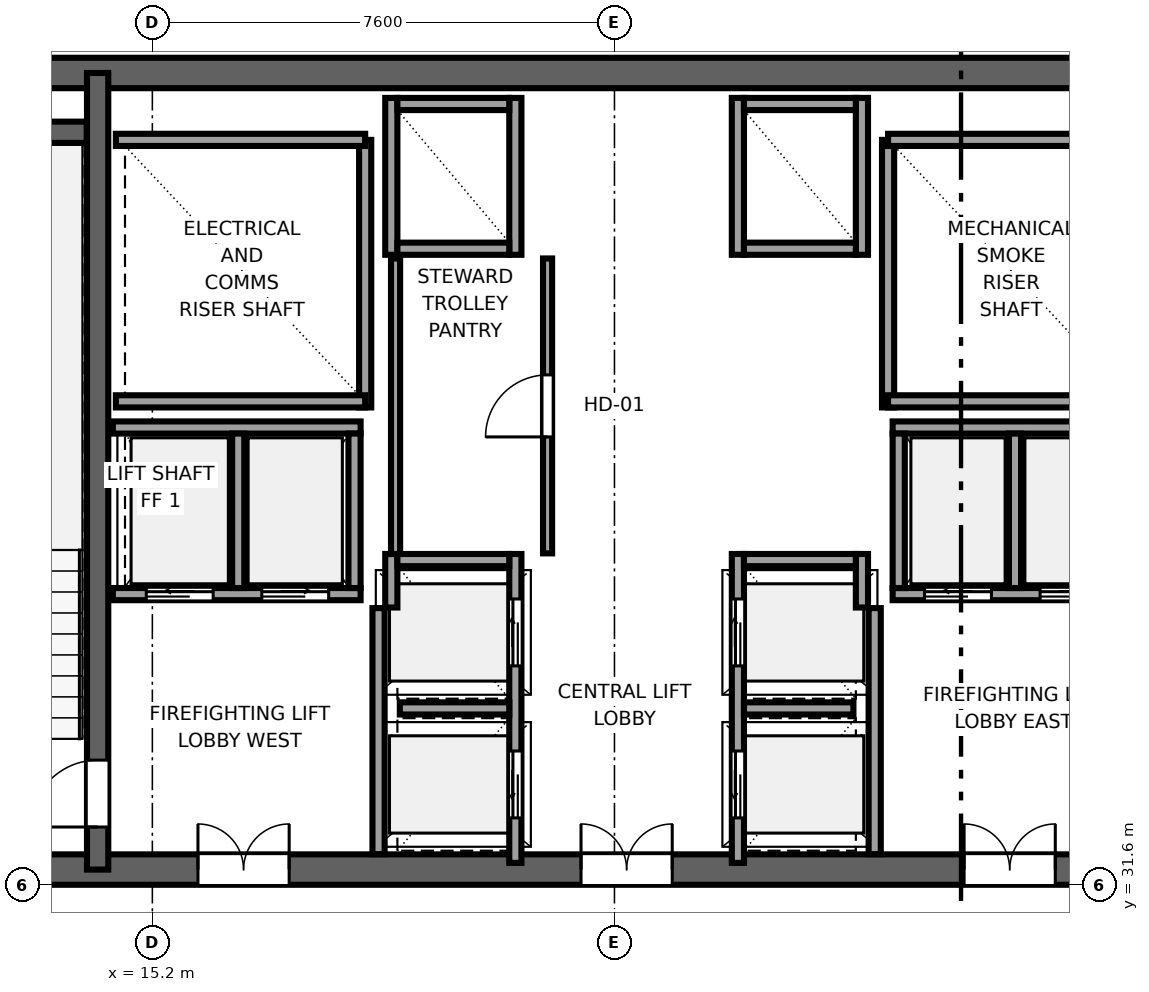
"""IFC4 building model, lengths in metres.
Left out: names, types, materials, properties, quantities, classifications, styles, units other than length and angle.
Written with IfcOpenShell. Run it as: python <this file> out.ifc"""

import sys

from ifc_helpers import new_model, si_unit, direction, frame, frame_2d, origin, place, context, subcontext, project, spatial, rectangle, extrude, source, transform, mapped, element, fill, save


model = new_model("IFC4")
c1 = context("Model", 3, precision=1e-05, world=origin(), true_north=direction((0.0, 1.0)))
c2 = subcontext(c1, "Body", "Model", "MODEL_VIEW")
j1 = project(units=[si_unit("LENGTHUNIT", "METRE"), si_unit("PLANEANGLEUNIT", "RADIAN")], contexts=[c1])
p1 = place(None, origin())
s1 = spatial("IfcSite", under=j1, at=p1, CompositionType="ELEMENT")
p2 = place(p1, origin())
s2 = spatial("IfcBuilding", under=s1, at=p2, CompositionType="ELEMENT")
p3 = place(p2, frame((0.0, 0.0, 241.65)))
s3 = spatial("IfcBuildingStorey", under=s2, at=p3, CompositionType="ELEMENT", Elevation=241.65)
p4 = place(p3, frame((10.0, 31.85, 0.0), z_axis=(0.0, 0.0, 1.0), x_axis=(1.0, 0.0, 0.0)))
e1 = element("IfcWall", 1, at=p4, inside=s3, PredefinedType="SHEAR", context=c2, shape_type="SweptSolid", body=[
    extrude(rectangle(XDim=26.0, YDim=0.5, at=frame_2d((13.0, 0.0))), origin(), (0.0, 0.0, 1.0), 3.55),
])
p5 = place(p4, frame((7.45, 0.0, 0.0), z_axis=(0.0, 0.0, 1.0), x_axis=(-1.0, 0.0, 0.0)))
e2 = element("IfcOpeningElement", 2, at=p5, cuts=e1, PredefinedType="OPENING", context=c2, shape_type="SweptSolid", body=[
    extrude(rectangle(XDim=1.5, YDim=2.04, at=frame_2d((0.75, 1.02))), frame((0.0, 0.26, 0.0), z_axis=(0.0, -1.0, 0.0), x_axis=(1.0, 0.0, 0.0)), (0.0, 0.0, 1.0), 0.52),
])
p6 = place(p4, frame((13.75, 0.0, 0.0), z_axis=(0.0, 0.0, 1.0), x_axis=(-1.0, 0.0, 0.0)))
e3 = element("IfcOpeningElement", 3, at=p6, cuts=e1, PredefinedType="OPENING", context=c2, shape_type="SweptSolid", body=[
    extrude(rectangle(XDim=1.5, YDim=2.04, at=frame_2d((0.75, 1.02))), frame((0.0, 0.26, 0.0), z_axis=(0.0, -1.0, 0.0), x_axis=(1.0, 0.0, 0.0)), (0.0, 0.0, 1.0), 0.52),
])
p7 = place(p4, frame((20.05, 0.0, 0.0), z_axis=(0.0, 0.0, 1.0), x_axis=(-1.0, 0.0, 0.0)))
e4 = element("IfcOpeningElement", 4, at=p7, cuts=e1, PredefinedType="OPENING", context=c2, shape_type="SweptSolid", body=[
    extrude(rectangle(XDim=1.5, YDim=2.04, at=frame_2d((0.75, 1.02))), frame((0.0, 0.26, 0.0), z_axis=(0.0, -1.0, 0.0), x_axis=(1.0, 0.0, 0.0)), (0.0, 0.0, 1.0), 0.52),
])
p8 = place(p3, frame((10.0, 44.95, 0.0), z_axis=(0.0, 0.0, 1.0), x_axis=(1.0, 0.0, 0.0)))
e5 = element("IfcWall", 5, at=p8, inside=s3, PredefinedType="SHEAR", context=c2, shape_type="SweptSolid", body=[
    extrude(rectangle(XDim=26.0, YDim=0.5, at=frame_2d((13.0, 0.0))), origin(), (0.0, 0.0, 1.0), 3.55),
])
p9 = place(p3, frame((14.3, 31.85, 0.0), z_axis=(0.0, 0.0, 1.0), x_axis=(0.0, 1.0, 0.0)))
e6 = element("IfcWall", 6, at=p9, inside=s3, PredefinedType="SHEAR", context=c2, shape_type="SweptSolid", body=[
    extrude(rectangle(XDim=13.1, YDim=0.35, at=frame_2d((6.55, 0.0))), origin(), (0.0, 0.0, 1.0), 3.55),
])
p10 = place(p9, frame((0.7, 0.0, 0.0)))
e7 = element("IfcOpeningElement", 7, at=p10, cuts=e6, PredefinedType="OPENING", context=c2, shape_type="SweptSolid", body=[
    extrude(rectangle(XDim=1.1, YDim=2.12, at=frame_2d((0.55, 1.06))), frame((0.0, 0.185, 0.0), z_axis=(0.0, -1.0, 0.0), x_axis=(1.0, 0.0, 0.0)), (0.0, 0.0, 1.0), 0.37),
])
p11 = place(p3, frame((10.52, 43.975, 0.0), z_axis=(0.0, 0.0, 1.0), x_axis=(1.0, 0.0, 0.0)))
e8 = element("IfcWall", 8, at=p11, inside=s3, PredefinedType="SHEAR", context=c2, shape_type="SweptSolid", body=[
    extrude(rectangle(XDim=3.6, YDim=0.35, at=frame_2d((1.8, 0.0))), origin(), (0.0, 0.0, 1.0), 3.55),
])
p12 = place(p3, frame((18.7, 39.45, 0.0), z_axis=(0.0, 0.0, 1.0), x_axis=(0.0, 1.0, 0.0)))
e9 = element("IfcWall", 9, at=p12, inside=s3, PredefinedType="SOLIDWALL", context=c2, shape_type="SweptSolid", body=[
    extrude(rectangle(XDim=4.4, YDim=0.2, at=frame_2d((2.2, 0.0))), origin(), (0.0, 0.0, 1.0), 3.37),
])
for number, where, z_axis, x_axis in (
    (10, (14.6, 39.55, 0.0), (0.0, 0.0, 1.0), (1.0, 0.0, 0.0)),
    (11, (14.6, 43.85, 0.0), (0.0, 0.0, 1.0), (1.0, 0.0, 0.0)),
):
    element("IfcWall", number, at=place(p3, frame(where, z_axis=z_axis, x_axis=x_axis)), inside=s3, PredefinedType="SOLIDWALL", context=c2, shape_type="SweptSolid", body=[
        extrude(rectangle(XDim=4.1, YDim=0.2, at=frame_2d((2.05, 0.0))), origin(), (0.0, 0.0, 1.0), 3.37),
    ])
p13 = place(p3, frame((27.3, 39.45, 0.0), z_axis=(0.0, 0.0, 1.0), x_axis=(0.0, 1.0, 0.0)))
e12 = element("IfcWall", 12, at=p13, inside=s3, PredefinedType="SOLIDWALL", context=c2, shape_type="SweptSolid", body=[
    extrude(rectangle(XDim=4.4, YDim=0.2, at=frame_2d((2.2, 0.0))), origin(), (0.0, 0.0, 1.0), 3.37),
])
for number, where, z_axis, x_axis in (
    (13, (27.3, 39.55, 0.0), (0.0, 0.0, 1.0), (1.0, 0.0, 0.0)),
    (14, (27.3, 43.85, 0.0), (0.0, 0.0, 1.0), (1.0, 0.0, 0.0)),
):
    element("IfcWall", number, at=place(p3, frame(where, z_axis=z_axis, x_axis=x_axis)), inside=s3, PredefinedType="SOLIDWALL", context=c2, shape_type="SweptSolid", body=[
        extrude(rectangle(XDim=4.1, YDim=0.2, at=frame_2d((2.05, 0.0))), origin(), (0.0, 0.0, 1.0), 3.37),
    ])
for number, where, z_axis, x_axis in (
    (15, (18.92, 32.104, 0.0), (0.0, 0.0, 1.0), (0.0, 1.0, 0.0)),
    (16, (27.08, 32.104, 0.0), (0.0, 0.0, 1.0), (0.0, 1.0, 0.0)),
):
    element("IfcWall", number, at=place(p3, frame(where, z_axis=z_axis, x_axis=x_axis)), inside=s3, PredefinedType="SOLIDWALL", context=c2, shape_type="SweptSolid", body=[
        extrude(rectangle(XDim=4.046, YDim=0.2, at=frame_2d((2.023, 0.0))), origin(), (0.0, 0.0, 1.0), 3.37),
    ])
p14 = place(p3, frame((21.17, 31.96, 0.0), z_axis=(0.0, 0.0, 1.0), x_axis=(0.0, 1.0, 0.0)))
e17 = element("IfcWall", 17, at=p14, inside=s3, PredefinedType="SOLIDWALL", context=c2, shape_type="SweptSolid", body=[
    extrude(rectangle(XDim=5.08, YDim=0.2, at=frame_2d((2.54, 0.0))), origin(), (0.0, 0.0, 1.0), 3.37),
])
p15 = place(p14, frame((0.74, 0.0, 0.0)))
e18 = element("IfcOpeningElement", 18, at=p15, cuts=e17, PredefinedType="OPENING", context=c2, shape_type="SweptSolid", body=[
    extrude(rectangle(XDim=1.1, YDim=2.12, at=frame_2d((0.55, 1.06))), frame((0.0, 0.11, 0.0), z_axis=(0.0, -1.0, 0.0), x_axis=(1.0, 0.0, 0.0)), (0.0, 0.0, 1.0), 0.22),
])
p16 = place(p14, frame((3.24, 0.0, 0.0)))
e19 = element("IfcOpeningElement", 19, at=p16, cuts=e17, PredefinedType="OPENING", context=c2, shape_type="SweptSolid", body=[
    extrude(rectangle(XDim=1.1, YDim=2.12, at=frame_2d((0.55, 1.06))), frame((0.0, 0.11, 0.0), z_axis=(0.0, -1.0, 0.0), x_axis=(1.0, 0.0, 0.0)), (0.0, 0.0, 1.0), 0.22),
])
p17 = place(p3, frame((19.13, 36.16, 0.0), z_axis=(0.0, 0.0, 1.0), x_axis=(0.0, 1.0, 0.0)))
e20 = element("IfcWall", 20, at=p17, inside=s3, PredefinedType="SOLIDWALL", context=c2, shape_type="SweptSolid", body=[
    extrude(rectangle(XDim=0.88, YDim=0.2, at=frame_2d((0.44, 0.0))), origin(), (0.0, 0.0, 1.0), 3.37),
])
p18 = place(p3, frame((19.23, 36.94, 0.0), z_axis=(0.0, 0.0, 1.0), x_axis=(1.0, 0.0, 0.0)))
e21 = element("IfcWall", 21, at=p18, inside=s3, PredefinedType="SOLIDWALL", context=c2, shape_type="SweptSolid", body=[
    extrude(rectangle(XDim=1.84, YDim=0.2, at=frame_2d((0.92, 0.0))), origin(), (0.0, 0.0, 1.0), 3.37),
])
p19 = place(p3, frame((19.27, 34.5, 0.0), z_axis=(0.0, 0.0, 1.0), x_axis=(1.0, 0.0, 0.0)))
e22 = element("IfcWall", 22, at=p19, inside=s3, PredefinedType="SOLIDWALL", context=c2, shape_type="SweptSolid", body=[
    extrude(rectangle(XDim=1.8, YDim=0.2, at=frame_2d((0.9, 0.0))), origin(), (0.0, 0.0, 1.0), 3.37),
])
for number, where, z_axis, x_axis in (
    (23, (21.17, 41.96, 0.0), (0.0, 0.0, 1.0), (0.0, 1.0, 0.0)),
    (24, (19.13, 41.96, 0.0), (0.0, 0.0, 1.0), (0.0, 1.0, 0.0)),
):
    element("IfcWall", number, at=place(p3, frame(where, z_axis=z_axis, x_axis=x_axis)), inside=s3, PredefinedType="SOLIDWALL", context=c2, shape_type="SweptSolid", body=[
        extrude(rectangle(XDim=2.58, YDim=0.2, at=frame_2d((1.29, 0.0))), origin(), (0.0, 0.0, 1.0), 3.37),
    ])
for number, where, z_axis, x_axis in (
    (25, (19.23, 42.06, 0.0), (0.0, 0.0, 1.0), (1.0, 0.0, 0.0)),
    (26, (19.23, 44.44, 0.0), (0.0, 0.0, 1.0), (1.0, 0.0, 0.0)),
):
    element("IfcWall", number, at=place(p3, frame(where, z_axis=z_axis, x_axis=x_axis)), inside=s3, PredefinedType="SOLIDWALL", context=c2, shape_type="SweptSolid", body=[
        extrude(rectangle(XDim=1.84, YDim=0.2, at=frame_2d((0.92, 0.0))), origin(), (0.0, 0.0, 1.0), 3.37),
    ])
p20 = place(p3, frame((27.375, 36.38, 0.0), z_axis=(0.0, 0.0, 1.0), x_axis=(1.0, 0.0, 0.0)))
e27 = element("IfcWall", 27, at=p20, inside=s3, PredefinedType="SOLIDWALL", context=c2, shape_type="SweptSolid", body=[
    extrude(rectangle(XDim=4.075, YDim=0.2, at=frame_2d((2.038, 0.0))), origin(), (0.0, 0.0, 1.0), 3.37),
])
p21 = place(p20, frame((0.525, 0.0, 0.0)))
e28 = element("IfcOpeningElement", 28, at=p21, cuts=e27, PredefinedType="OPENING", context=c2, shape_type="SweptSolid", body=[
    extrude(rectangle(XDim=1.1, YDim=2.12, at=frame_2d((0.55, 1.06))), frame((0.0, 0.11, 0.0), z_axis=(0.0, -1.0, 0.0), x_axis=(1.0, 0.0, 0.0)), (0.0, 0.0, 1.0), 0.22),
])
p22 = place(p20, frame((2.425, 0.0, 0.0)))
e29 = element("IfcOpeningElement", 29, at=p22, cuts=e27, PredefinedType="OPENING", context=c2, shape_type="SweptSolid", body=[
    extrude(rectangle(XDim=1.1, YDim=2.12, at=frame_2d((0.55, 1.06))), frame((0.0, 0.11, 0.0), z_axis=(0.0, -1.0, 0.0), x_axis=(1.0, 0.0, 0.0)), (0.0, 0.0, 1.0), 0.22),
])
p23 = place(p3, frame((27.375, 39.12, 0.0), z_axis=(0.0, 0.0, 1.0), x_axis=(1.0, 0.0, 0.0)))
e30 = element("IfcWall", 30, at=p23, inside=s3, PredefinedType="SOLIDWALL", context=c2, shape_type="SweptSolid", body=[
    extrude(rectangle(XDim=4.075, YDim=0.2, at=frame_2d((2.038, 0.0))), origin(), (0.0, 0.0, 1.0), 3.37),
])
for number, where, z_axis, x_axis in (
    (31, (27.475, 36.48, 0.0), (0.0, 0.0, 1.0), (0.0, 1.0, 0.0)),
    (32, (29.387, 36.48, 0.0), (0.0, 0.0, 1.0), (0.0, 1.0, 0.0)),
):
    element("IfcWall", number, at=place(p3, frame(where, z_axis=z_axis, x_axis=x_axis)), inside=s3, PredefinedType="SOLIDWALL", context=c2, shape_type="SweptSolid", body=[
        extrude(rectangle(XDim=2.54, YDim=0.2, at=frame_2d((1.27, 0.0))), origin(), (0.0, 0.0, 1.0), 3.37),
    ])
p24 = place(p3, frame((14.55, 36.38, 0.0), z_axis=(0.0, 0.0, 1.0), x_axis=(1.0, 0.0, 0.0)))
e33 = element("IfcWall", 33, at=p24, inside=s3, PredefinedType="SOLIDWALL", context=c2, shape_type="SweptSolid", body=[
    extrude(rectangle(XDim=4.075, YDim=0.2, at=frame_2d((2.038, 0.0))), origin(), (0.0, 0.0, 1.0), 3.37),
])
p25 = place(p24, frame((0.55, 0.0, 0.0)))
e34 = element("IfcOpeningElement", 34, at=p25, cuts=e33, PredefinedType="OPENING", context=c2, shape_type="SweptSolid", body=[
    extrude(rectangle(XDim=1.1, YDim=2.12, at=frame_2d((0.55, 1.06))), frame((0.0, 0.11, 0.0), z_axis=(0.0, -1.0, 0.0), x_axis=(1.0, 0.0, 0.0)), (0.0, 0.0, 1.0), 0.22),
])
p26 = place(p24, frame((2.45, 0.0, 0.0)))
e35 = element("IfcOpeningElement", 35, at=p26, cuts=e33, PredefinedType="OPENING", context=c2, shape_type="SweptSolid", body=[
    extrude(rectangle(XDim=1.1, YDim=2.12, at=frame_2d((0.55, 1.06))), frame((0.0, 0.11, 0.0), z_axis=(0.0, -1.0, 0.0), x_axis=(1.0, 0.0, 0.0)), (0.0, 0.0, 1.0), 0.22),
])
p27 = place(p3, frame((14.55, 39.12, 0.0), z_axis=(0.0, 0.0, 1.0), x_axis=(1.0, 0.0, 0.0)))
e36 = element("IfcWall", 36, at=p27, inside=s3, PredefinedType="SOLIDWALL", context=c2, shape_type="SweptSolid", body=[
    extrude(rectangle(XDim=4.075, YDim=0.2, at=frame_2d((2.038, 0.0))), origin(), (0.0, 0.0, 1.0), 3.37),
])
for number, where, z_axis, x_axis in (
    (37, (18.525, 36.48, 0.0), (0.0, 0.0, 1.0), (0.0, 1.0, 0.0)),
    (38, (16.613, 36.48, 0.0), (0.0, 0.0, 1.0), (0.0, 1.0, 0.0)),
):
    element("IfcWall", number, at=place(p3, frame(where, z_axis=z_axis, x_axis=x_axis)), inside=s3, PredefinedType="SOLIDWALL", context=c2, shape_type="SweptSolid", body=[
        extrude(rectangle(XDim=2.54, YDim=0.2, at=frame_2d((1.27, 0.0))), origin(), (0.0, 0.0, 1.0), 3.37),
    ])
p28 = place(p3, frame((24.83, 31.96, 0.0), z_axis=(0.0, 0.0, 1.0), x_axis=(0.0, 1.0, 0.0)))
e39 = element("IfcWall", 39, at=p28, inside=s3, PredefinedType="SOLIDWALL", context=c2, shape_type="SweptSolid", body=[
    extrude(rectangle(XDim=5.08, YDim=0.2, at=frame_2d((2.54, 0.0))), origin(), (0.0, 0.0, 1.0), 3.37),
])
p29 = place(p28, frame((0.74, 0.0, 0.0)))
e40 = element("IfcOpeningElement", 40, at=p29, cuts=e39, PredefinedType="OPENING", context=c2, shape_type="SweptSolid", body=[
    extrude(rectangle(XDim=1.1, YDim=2.12, at=frame_2d((0.55, 1.06))), frame((0.0, 0.11, 0.0), z_axis=(0.0, -1.0, 0.0), x_axis=(1.0, 0.0, 0.0)), (0.0, 0.0, 1.0), 0.22),
])
p30 = place(p28, frame((3.24, 0.0, 0.0)))
e41 = element("IfcOpeningElement", 41, at=p30, cuts=e39, PredefinedType="OPENING", context=c2, shape_type="SweptSolid", body=[
    extrude(rectangle(XDim=1.1, YDim=2.12, at=frame_2d((0.55, 1.06))), frame((0.0, 0.11, 0.0), z_axis=(0.0, -1.0, 0.0), x_axis=(1.0, 0.0, 0.0)), (0.0, 0.0, 1.0), 0.22),
])
p31 = place(p3, frame((26.87, 36.16, 0.0), z_axis=(0.0, 0.0, 1.0), x_axis=(0.0, 1.0, 0.0)))
e42 = element("IfcWall", 42, at=p31, inside=s3, PredefinedType="SOLIDWALL", context=c2, shape_type="SweptSolid", body=[
    extrude(rectangle(XDim=0.88, YDim=0.2, at=frame_2d((0.44, 0.0))), origin(), (0.0, 0.0, 1.0), 3.37),
])
p32 = place(p3, frame((24.93, 36.94, 0.0), z_axis=(0.0, 0.0, 1.0), x_axis=(1.0, 0.0, 0.0)))
e43 = element("IfcWall", 43, at=p32, inside=s3, PredefinedType="SOLIDWALL", context=c2, shape_type="SweptSolid", body=[
    extrude(rectangle(XDim=1.84, YDim=0.2, at=frame_2d((0.92, 0.0))), origin(), (0.0, 0.0, 1.0), 3.37),
])
p33 = place(p3, frame((24.93, 34.5, 0.0), z_axis=(0.0, 0.0, 1.0), x_axis=(1.0, 0.0, 0.0)))
e44 = element("IfcWall", 44, at=p33, inside=s3, PredefinedType="SOLIDWALL", context=c2, shape_type="SweptSolid", body=[
    extrude(rectangle(XDim=1.8, YDim=0.2, at=frame_2d((0.9, 0.0))), origin(), (0.0, 0.0, 1.0), 3.37),
])
for number, where, z_axis, x_axis in (
    (45, (24.83, 41.96, 0.0), (0.0, 0.0, 1.0), (0.0, 1.0, 0.0)),
    (46, (26.87, 41.96, 0.0), (0.0, 0.0, 1.0), (0.0, 1.0, 0.0)),
):
    element("IfcWall", number, at=place(p3, frame(where, z_axis=z_axis, x_axis=x_axis)), inside=s3, PredefinedType="SOLIDWALL", context=c2, shape_type="SweptSolid", body=[
        extrude(rectangle(XDim=2.58, YDim=0.2, at=frame_2d((1.29, 0.0))), origin(), (0.0, 0.0, 1.0), 3.37),
    ])
for number, where, z_axis, x_axis in (
    (47, (24.93, 42.06, 0.0), (0.0, 0.0, 1.0), (1.0, 0.0, 0.0)),
    (48, (24.93, 44.44, 0.0), (0.0, 0.0, 1.0), (1.0, 0.0, 0.0)),
):
    element("IfcWall", number, at=place(p3, frame(where, z_axis=z_axis, x_axis=x_axis)), inside=s3, PredefinedType="SOLIDWALL", context=c2, shape_type="SweptSolid", body=[
        extrude(rectangle(XDim=1.84, YDim=0.2, at=frame_2d((0.92, 0.0))), origin(), (0.0, 0.0, 1.0), 3.37),
    ])
p34 = place(p3, frame((21.7, 37.05, 0.0), z_axis=(0.0, 0.0, 1.0), x_axis=(0.0, 1.0, 0.0)))
e49 = element("IfcWall", 49, at=p34, inside=s3, PredefinedType="PARTITIONING", context=c2, shape_type="SweptSolid", body=[
    extrude(rectangle(XDim=4.85, YDim=0.15, at=frame_2d((2.425, 0.0))), origin(), (0.0, 0.0, 1.0), 3.37),
])
p35 = place(p34, frame((1.915, 0.0, 0.0)))
e50 = element("IfcOpeningElement", 50, at=p35, cuts=e49, PredefinedType="OPENING", context=c2, shape_type="SweptSolid", body=[
    extrude(rectangle(XDim=1.02, YDim=2.03, at=frame_2d((0.51, 1.015))), frame((0.0, 0.085, 0.0), z_axis=(0.0, -1.0, 0.0), x_axis=(1.0, 0.0, 0.0)), (0.0, 0.0, 1.0), 0.17),
])
p36 = place(p3, frame((19.2, 37.04, 0.0), z_axis=(0.0, 0.0, 1.0), x_axis=(0.0, 1.0, 0.0)))
e51 = element("IfcWall", 51, at=p36, inside=s3, PredefinedType="PARTITIONING", context=c2, shape_type="SweptSolid", body=[
    extrude(rectangle(XDim=4.86, YDim=0.15, at=frame_2d((2.43, 0.0))), origin(), (0.0, 0.0, 1.0), 3.37),
])
m1 = source(origin(), c2, "Body", "SweptSolid", [
    extrude(rectangle(XDim=1.1, YDim=2.12, at=frame_2d((0.55, 1.06))), frame((0.0, 0.025, 0.0), z_axis=(0.0, -1.0, 0.0), x_axis=(1.0, 0.0, 0.0)), (0.0, 0.0, 1.0), 0.05),
])
p37 = place(p10, origin())
e52 = element("IfcDoor", 52, at=p37, inside=s3, OperationType="SINGLE_SWING_LEFT", PredefinedType="DOOR", context=c2, shape_type="MappedRepresentation", body=[
    mapped(m1, transform((0.0, 0.0, 0.0), x_axis=(1.0, 0.0, 0.0), y_axis=(0.0, 1.0, 0.0), z_axis=(0.0, 0.0, 1.0), scale=1.0)),
])
fill(e7, e52)
m2 = source(origin(), c2, "Body", "SweptSolid", [
    extrude(rectangle(XDim=1.5, YDim=2.04, at=frame_2d((0.75, 1.02))), frame((0.0, 0.025, 0.0), z_axis=(0.0, -1.0, 0.0), x_axis=(1.0, 0.0, 0.0)), (0.0, 0.0, 1.0), 0.05),
])
p38 = place(p5, origin())
e53 = element("IfcDoor", 53, at=p38, inside=s3, OperationType="DOUBLE_DOOR_SINGLE_SWING", PredefinedType="DOOR", context=c2, shape_type="MappedRepresentation", body=[
    mapped(m2, transform((0.0, 0.0, 0.0), x_axis=(1.0, 0.0, 0.0), y_axis=(0.0, 1.0, 0.0), z_axis=(0.0, 0.0, 1.0), scale=1.0)),
])
fill(e2, e53)
p39 = place(p6, origin())
e54 = element("IfcDoor", 54, at=p39, inside=s3, OperationType="DOUBLE_DOOR_SINGLE_SWING", PredefinedType="DOOR", context=c2, shape_type="MappedRepresentation", body=[
    mapped(m2, transform((0.0, 0.0, 0.0), x_axis=(1.0, 0.0, 0.0), y_axis=(0.0, 1.0, 0.0), z_axis=(0.0, 0.0, 1.0), scale=1.0)),
])
fill(e3, e54)
p40 = place(p7, origin())
e55 = element("IfcDoor", 55, at=p40, inside=s3, OperationType="DOUBLE_DOOR_SINGLE_SWING", PredefinedType="DOOR", context=c2, shape_type="MappedRepresentation", body=[
    mapped(m2, transform((0.0, 0.0, 0.0), x_axis=(1.0, 0.0, 0.0), y_axis=(0.0, 1.0, 0.0), z_axis=(0.0, 0.0, 1.0), scale=1.0)),
])
fill(e4, e55)
m3 = source(origin(), c2, "Body", "SweptSolid", [
    extrude(rectangle(XDim=1.1, YDim=2.12, at=frame_2d((0.55, 1.06))), frame((0.0, 0.025, 0.0), z_axis=(0.0, -1.0, 0.0), x_axis=(1.0, 0.0, 0.0)), (0.0, 0.0, 1.0), 0.05),
])
p41 = place(p15, origin())
e56 = element("IfcDoor", 56, at=p41, inside=s3, OperationType="SLIDING_TO_LEFT", PredefinedType="DOOR", context=c2, shape_type="MappedRepresentation", body=[
    mapped(m3, transform((0.0, 0.0, 0.0), x_axis=(1.0, 0.0, 0.0), y_axis=(0.0, 1.0, 0.0), z_axis=(0.0, 0.0, 1.0), scale=1.0)),
])
fill(e18, e56)
p42 = place(p16, origin())
e57 = element("IfcDoor", 57, at=p42, inside=s3, OperationType="SLIDING_TO_RIGHT", PredefinedType="DOOR", context=c2, shape_type="MappedRepresentation", body=[
    mapped(m3, transform((0.0, 0.0, 0.0), x_axis=(1.0, 0.0, 0.0), y_axis=(0.0, 1.0, 0.0), z_axis=(0.0, 0.0, 1.0), scale=1.0)),
])
fill(e19, e57)
p43 = place(p21, origin())
e58 = element("IfcDoor", 58, at=p43, inside=s3, OperationType="SLIDING_TO_LEFT", PredefinedType="DOOR", context=c2, shape_type="MappedRepresentation", body=[
    mapped(m3, transform((0.0, 0.0, 0.0), x_axis=(1.0, 0.0, 0.0), y_axis=(0.0, 1.0, 0.0), z_axis=(0.0, 0.0, 1.0), scale=1.0)),
])
fill(e28, e58)
p44 = place(p22, origin())
e59 = element("IfcDoor", 59, at=p44, inside=s3, OperationType="SLIDING_TO_RIGHT", PredefinedType="DOOR", context=c2, shape_type="MappedRepresentation", body=[
    mapped(m3, transform((0.0, 0.0, 0.0), x_axis=(1.0, 0.0, 0.0), y_axis=(0.0, 1.0, 0.0), z_axis=(0.0, 0.0, 1.0), scale=1.0)),
])
fill(e29, e59)
p45 = place(p25, origin())
e60 = element("IfcDoor", 60, at=p45, inside=s3, OperationType="SLIDING_TO_LEFT", PredefinedType="DOOR", context=c2, shape_type="MappedRepresentation", body=[
    mapped(m3, transform((0.0, 0.0, 0.0), x_axis=(1.0, 0.0, 0.0), y_axis=(0.0, 1.0, 0.0), z_axis=(0.0, 0.0, 1.0), scale=1.0)),
])
fill(e34, e60)
p46 = place(p26, origin())
e61 = element("IfcDoor", 61, at=p46, inside=s3, OperationType="SLIDING_TO_RIGHT", PredefinedType="DOOR", context=c2, shape_type="MappedRepresentation", body=[
    mapped(m3, transform((0.0, 0.0, 0.0), x_axis=(1.0, 0.0, 0.0), y_axis=(0.0, 1.0, 0.0), z_axis=(0.0, 0.0, 1.0), scale=1.0)),
])
fill(e35, e61)
p47 = place(p29, origin())
e62 = element("IfcDoor", 62, at=p47, inside=s3, OperationType="SLIDING_TO_LEFT", PredefinedType="DOOR", context=c2, shape_type="MappedRepresentation", body=[
    mapped(m3, transform((0.0, 0.0, 0.0), x_axis=(1.0, 0.0, 0.0), y_axis=(0.0, 1.0, 0.0), z_axis=(0.0, 0.0, 1.0), scale=1.0)),
])
fill(e40, e62)
p48 = place(p30, origin())
e63 = element("IfcDoor", 63, at=p48, inside=s3, OperationType="SLIDING_TO_RIGHT", PredefinedType="DOOR", context=c2, shape_type="MappedRepresentation", body=[
    mapped(m3, transform((0.0, 0.0, 0.0), x_axis=(1.0, 0.0, 0.0), y_axis=(0.0, 1.0, 0.0), z_axis=(0.0, 0.0, 1.0), scale=1.0)),
])
fill(e41, e63)
m4 = source(origin(), c2, "Body", "SweptSolid", [
    extrude(rectangle(XDim=1.02, YDim=2.03, at=frame_2d((0.51, 1.015))), frame((0.0, 0.025, 0.0), z_axis=(0.0, -1.0, 0.0), x_axis=(1.0, 0.0, 0.0)), (0.0, 0.0, 1.0), 0.05),
])
p49 = place(p35, origin())
e64 = element("IfcDoor", 64, at=p49, inside=s3, OperationType="SINGLE_SWING_LEFT", PredefinedType="DOOR", context=c2, shape_type="MappedRepresentation", body=[
    mapped(m4, transform((0.0, 0.0, 0.0), x_axis=(1.0, 0.0, 0.0), y_axis=(0.0, 1.0, 0.0), z_axis=(0.0, 0.0, 1.0), scale=1.0)),
])
fill(e50, e64)
save(model, sys.argv[1])
